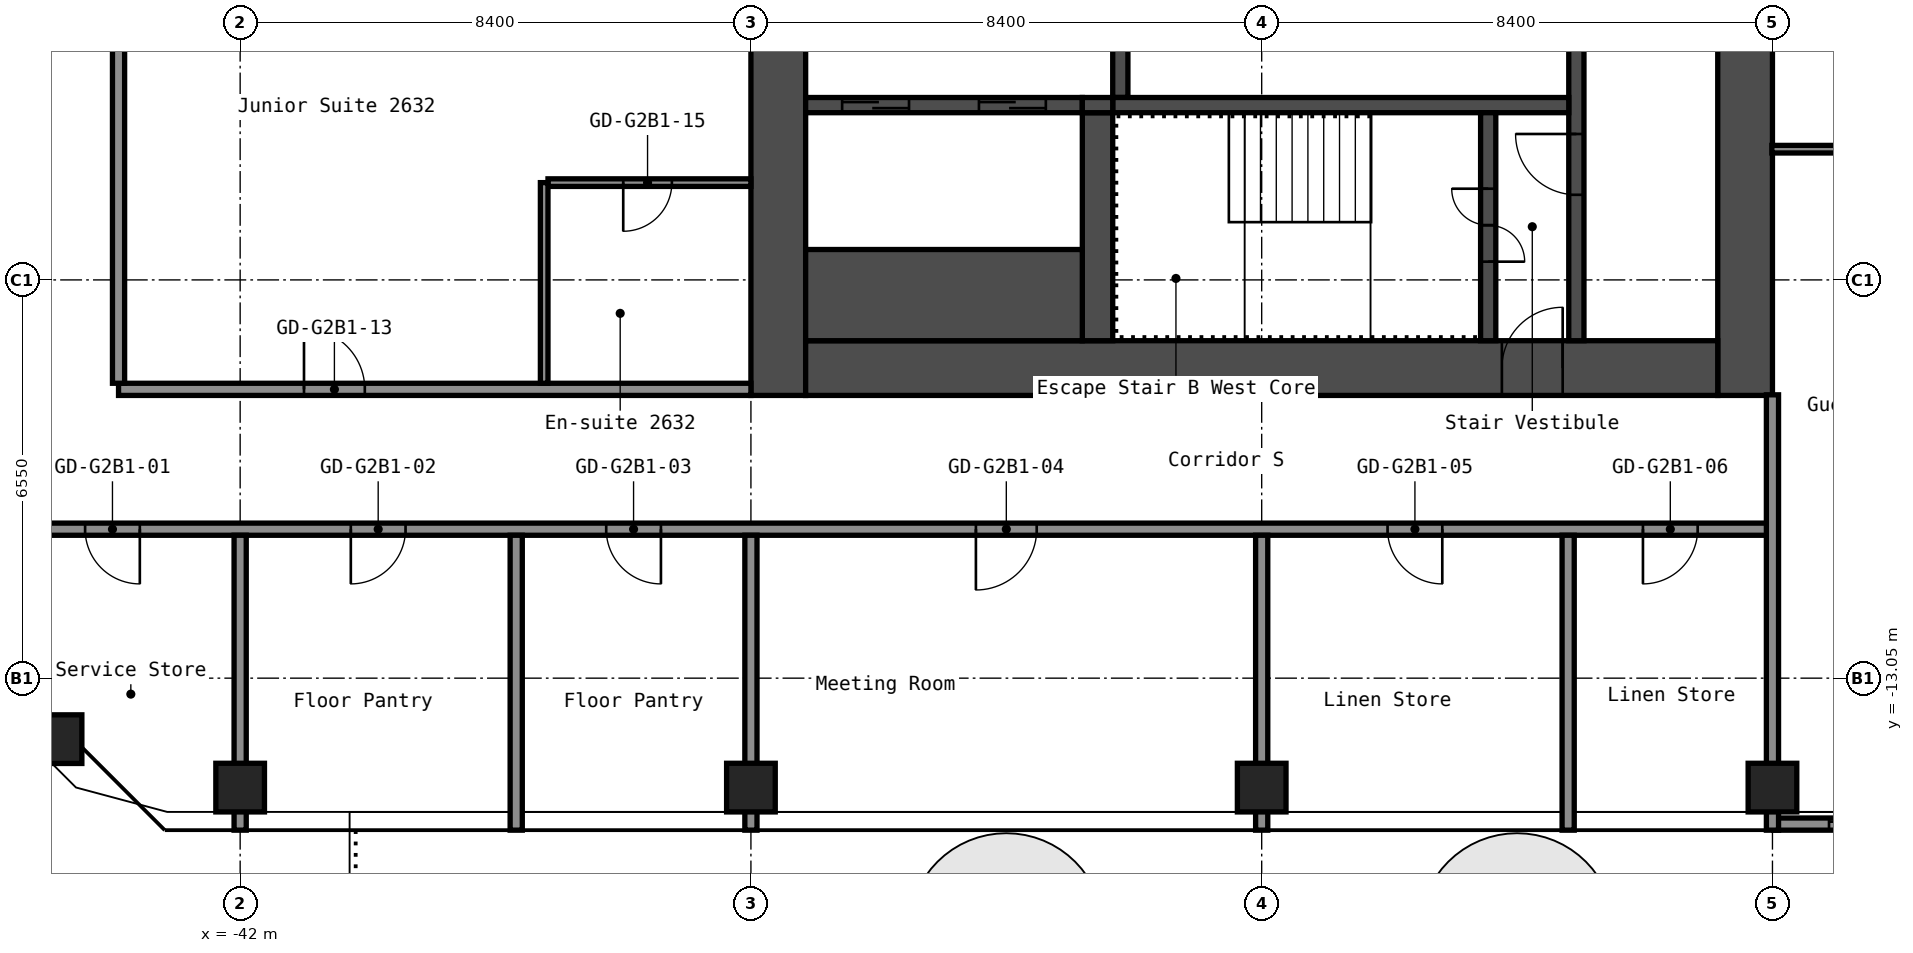
"""IFC4 building model, lengths in metres.
Left out: names, types, materials, properties, quantities, classifications, styles, units other than length and angle.
Written with IfcOpenShell. Run it as: python <this file> out.ifc"""

import sys

from ifc_helpers import new_model, si_unit, direction, frame, frame_2d, origin, origin_2d, place, context, subcontext, project, spatial, rectangle, hollow_rectangle, extrude, element, fill, save


model = new_model("IFC4")
c1 = context("Model", 3, precision=1e-05, world=origin(), true_north=direction((0.0, 1.0)))
c2 = subcontext(c1, "Body", "Model", "MODEL_VIEW")
j1 = project(units=[si_unit("LENGTHUNIT", "METRE"), si_unit("PLANEANGLEUNIT", "RADIAN")], contexts=[c1])
p1 = place(None, origin())
s1 = spatial("IfcSite", under=j1, at=p1, CompositionType="ELEMENT")
p2 = place(p1, origin())
s2 = spatial("IfcBuilding", under=s1, at=p2, CompositionType="ELEMENT")
p3 = place(p2, frame((0.0, 0.0, 94.6)))
s3 = spatial("IfcBuildingStorey", under=s2, at=p3, CompositionType="ELEMENT", Elevation=94.6)
for number, where, z_axis, x_axis in (
    (1, (-45.003, -14.053, 0.0), (0.0, 0.0, 1.0), (1.0, 0.0, 0.0)),
    (2, (-42.0, -14.85, 0.0), (0.0, 0.0, 1.0), (1.0, 0.0, 0.0)),
    (3, (-33.6, -14.85, 0.0), (0.0, 0.0, 1.0), (1.0, 0.0, 0.0)),
    (4, (-25.2, -14.85, 0.0), (0.0, 0.0, 1.0), (1.0, 0.0, 0.0)),
    (5, (-16.8, -14.85, 0.0), (0.0, 0.0, 1.0), (1.0, 0.0, 0.0)),
):
    element("IfcColumn", number, at=place(p3, frame(where, z_axis=z_axis, x_axis=x_axis)), inside=s3, PredefinedType="COLUMN", context=c2, shape_type="SweptSolid", body=[
        extrude(hollow_rectangle(XDim=0.8, YDim=0.8, WallThickness=0.032, at=origin_2d()), origin(), (0.0, 0.0, 1.0), 2.8),
    ])
p4 = place(p3, frame((-17.25, -8.4, 0.0), z_axis=(0.0, 0.0, 1.0), x_axis=(0.0, 1.0, 0.0)))
e6 = element("IfcWall", 6, at=p4, inside=s3, PredefinedType="SHEAR", context=c2, shape_type="SweptSolid", body=[
    extrude(rectangle(XDim=16.8, YDim=0.9, at=frame_2d((8.4, 0.0))), origin(), (0.0, 0.0, 1.0), 2.8),
])
p5 = place(p4, frame((7.6, 0.0, 0.0)))
e7 = element("IfcOpeningElement", 7, at=p5, cuts=e6, PredefinedType="OPENING", context=c2, shape_type="SweptSolid", body=[
    extrude(rectangle(XDim=1.2, YDim=2.1, at=frame_2d((0.6, 1.05))), frame((0.0, 0.46, 0.0), z_axis=(0.0, -1.0, 0.0), x_axis=(1.0, 0.0, 0.0)), (0.0, 0.0, 1.0), 0.92),
])
p6 = place(p3, frame((-33.15, -8.4, 0.0), z_axis=(0.0, 0.0, 1.0), x_axis=(0.0, 1.0, 0.0)))
e8 = element("IfcWall", 8, at=p6, inside=s3, PredefinedType="SHEAR", context=c2, shape_type="SweptSolid", body=[
    extrude(rectangle(XDim=16.8, YDim=0.9, at=frame_2d((8.4, 0.0))), origin(), (0.0, 0.0, 1.0), 2.8),
])
p7 = place(p3, frame((-32.7, -7.95, 0.0), z_axis=(0.0, 0.0, 1.0), x_axis=(1.0, 0.0, 0.0)))
e9 = element("IfcWall", 9, at=p7, inside=s3, PredefinedType="SHEAR", context=c2, shape_type="SweptSolid", body=[
    extrude(rectangle(XDim=15.0, YDim=0.9, at=frame_2d((7.5, 0.0))), origin(), (0.0, 0.0, 1.0), 2.8),
])
p8 = place(p7, frame((11.45, 0.0, 0.0)))
e10 = element("IfcOpeningElement", 10, at=p8, cuts=e9, PredefinedType="OPENING", context=c2, shape_type="SweptSolid", body=[
    extrude(rectangle(XDim=1.0, YDim=2.1, at=frame_2d((0.5, 1.05))), frame((0.0, 0.46, 0.0), z_axis=(0.0, -1.0, 0.0), x_axis=(1.0, 0.0, 0.0)), (0.0, 0.0, 1.0), 0.92),
])
p9 = place(p3, frame((-20.025, -7.5, 0.0), z_axis=(0.0, 0.0, 1.0), x_axis=(0.0, 1.0, 0.0)))
e11 = element("IfcWall", 11, at=p9, inside=s3, PredefinedType="SHEAR", context=c2, shape_type="SweptSolid", body=[
    extrude(rectangle(XDim=6.3, YDim=0.25, at=frame_2d((3.15, 0.0))), origin(), (0.0, 0.0, 1.0), 2.8),
])
p10 = place(p9, frame((2.4, 0.0, 0.0)))
e12 = element("IfcOpeningElement", 12, at=p10, cuts=e11, PredefinedType="OPENING", context=c2, shape_type="SweptSolid", body=[
    extrude(rectangle(XDim=1.0, YDim=2.1, at=frame_2d((0.5, 1.05))), frame((0.0, 0.135, 0.0), z_axis=(0.0, -1.0, 0.0), x_axis=(1.0, 0.0, 0.0)), (0.0, 0.0, 1.0), 0.27),
])
p11 = place(p3, frame((-27.525, -3.5, 0.0), z_axis=(0.0, 0.0, 1.0), x_axis=(0.0, 1.0, 0.0)))
e13 = element("IfcWall", 13, at=p11, inside=s3, PredefinedType="SHEAR", context=c2, shape_type="SweptSolid", body=[
    extrude(rectangle(XDim=2.05, YDim=0.25, at=frame_2d((1.025, 0.0))), origin(), (0.0, 0.0, 1.0), 2.8),
])
p12 = place(p3, frame((-27.65, -3.625, 0.0), z_axis=(0.0, 0.0, 1.0), x_axis=(1.0, 0.0, 0.0)))
e14 = element("IfcWall", 14, at=p12, inside=s3, PredefinedType="SHEAR", context=c2, shape_type="SweptSolid", body=[
    extrude(rectangle(XDim=7.5, YDim=0.25, at=frame_2d((3.75, 0.0))), origin(), (0.0, 0.0, 1.0), 2.8),
])
p13 = place(p3, frame((-21.475, -7.5, 0.0), z_axis=(0.0, 0.0, 1.0), x_axis=(0.0, 1.0, 0.0)))
e15 = element("IfcWall", 15, at=p13, inside=s3, PredefinedType="SHEAR", context=c2, shape_type="SweptSolid", body=[
    extrude(rectangle(XDim=3.75, YDim=0.25, at=frame_2d((1.875, 0.0))), origin(), (0.0, 0.0, 1.0), 2.8),
])
p14 = place(p13, frame((1.3, 0.0, 0.0)))
e16 = element("IfcOpeningElement", 16, at=p14, cuts=e15, PredefinedType="OPENING", context=c2, shape_type="SweptSolid", body=[
    extrude(rectangle(XDim=1.2, YDim=2.1, at=frame_2d((0.6, 1.05))), frame((0.0, 0.135, 0.0), z_axis=(0.0, -1.0, 0.0), x_axis=(1.0, 0.0, 0.0)), (0.0, 0.0, 1.0), 0.27),
])
p15 = place(p3, frame((-27.9, -7.5, 0.0), z_axis=(0.0, 0.0, 1.0), x_axis=(0.0, 1.0, 0.0)))
e17 = element("IfcWall", 17, at=p15, inside=s3, PredefinedType="SHEAR", context=c2, shape_type="SweptSolid", body=[
    extrude(rectangle(XDim=3.75, YDim=0.5, at=frame_2d((1.875, 0.0))), origin(), (0.0, 0.0, 1.0), 2.8),
])
p16 = place(p3, frame((-32.7, -3.625, 0.0), z_axis=(0.0, 0.0, 1.0), x_axis=(1.0, 0.0, 0.0)))
e18 = element("IfcWall", 18, at=p16, inside=s3, PredefinedType="SHEAR", context=c2, shape_type="SweptSolid", body=[
    extrude(rectangle(XDim=4.55, YDim=0.25, at=frame_2d((2.275, 0.0))), origin(), (0.0, 0.0, 1.0), 2.8),
])
p17 = place(p16, frame((2.85, 0.0, 0.0)))
e19 = element("IfcOpeningElement", 19, at=p17, cuts=e18, PredefinedType="OPENING", context=c2, shape_type="SweptSolid", body=[
    extrude(rectangle(XDim=1.1, YDim=2.1, at=frame_2d((0.55, 1.05))), frame((0.0, 0.135, 0.0), z_axis=(0.0, -1.0, 0.0), x_axis=(1.0, 0.0, 0.0)), (0.0, 0.0, 1.0), 0.27),
])
p18 = place(p16, frame((0.6, 0.0, 0.0)))
e20 = element("IfcOpeningElement", 20, at=p18, cuts=e18, PredefinedType="OPENING", context=c2, shape_type="SweptSolid", body=[
    extrude(rectangle(XDim=1.1, YDim=2.1, at=frame_2d((0.55, 1.05))), frame((0.0, 0.135, 0.0), z_axis=(0.0, -1.0, 0.0), x_axis=(1.0, 0.0, 0.0)), (0.0, 0.0, 1.0), 0.27),
])
p19 = place(p3, frame((-32.7, -6.75, 0.0), z_axis=(0.0, 0.0, 1.0), x_axis=(1.0, 0.0, 0.0)))
e21 = element("IfcWall", 21, at=p19, inside=s3, PredefinedType="SHEAR", context=c2, shape_type="SweptSolid", body=[
    extrude(rectangle(XDim=4.55, YDim=1.5, at=frame_2d((2.275, 0.0))), origin(), (0.0, 0.0, 1.0), 2.8),
])
p20 = place(p3, frame((-28.15, -3.625, 0.0), z_axis=(0.0, 0.0, 1.0), x_axis=(1.0, 0.0, 0.0)))
e22 = element("IfcWall", 22, at=p20, inside=s3, PredefinedType="SHEAR", context=c2, shape_type="SweptSolid", body=[
    extrude(rectangle(XDim=0.5, YDim=0.25, at=frame_2d((0.25, 0.0))), origin(), (0.0, 0.0, 1.0), 2.8),
])
p21 = place(p3, frame((-46.5, -10.6, 0.0), z_axis=(0.0, 0.0, 1.0), x_axis=(1.0, 0.0, 0.0)))
e23 = element("IfcWall", 23, at=p21, inside=s3, PredefinedType="PARTITIONING", context=c2, shape_type="SweptSolid", body=[
    extrude(rectangle(XDim=29.7, YDim=0.2, at=frame_2d((14.85, 0.0))), origin(), (0.0, 0.0, 1.0), 2.8),
])
p22 = place(p21, frame((1.95, 0.0, 0.0)))
e24 = element("IfcOpeningElement", 24, at=p22, cuts=e23, PredefinedType="OPENING", context=c2, shape_type="SweptSolid", body=[
    extrude(rectangle(XDim=0.9, YDim=2.1, at=frame_2d((0.45, 1.05))), frame((0.0, 0.11, 0.0), z_axis=(0.0, -1.0, 0.0), x_axis=(1.0, 0.0, 0.0)), (0.0, 0.0, 1.0), 0.22),
])
p23 = place(p21, frame((6.32, 0.0, 0.0)))
e25 = element("IfcOpeningElement", 25, at=p23, cuts=e23, PredefinedType="OPENING", context=c2, shape_type="SweptSolid", body=[
    extrude(rectangle(XDim=0.9, YDim=2.1, at=frame_2d((0.45, 1.05))), frame((0.0, 0.11, 0.0), z_axis=(0.0, -1.0, 0.0), x_axis=(1.0, 0.0, 0.0)), (0.0, 0.0, 1.0), 0.22),
])
p24 = place(p21, frame((10.52, 0.0, 0.0)))
e26 = element("IfcOpeningElement", 26, at=p24, cuts=e23, PredefinedType="OPENING", context=c2, shape_type="SweptSolid", body=[
    extrude(rectangle(XDim=0.9, YDim=2.1, at=frame_2d((0.45, 1.05))), frame((0.0, 0.11, 0.0), z_axis=(0.0, -1.0, 0.0), x_axis=(1.0, 0.0, 0.0)), (0.0, 0.0, 1.0), 0.22),
])
p25 = place(p21, frame((16.6, 0.0, 0.0)))
e27 = element("IfcOpeningElement", 27, at=p25, cuts=e23, PredefinedType="OPENING", context=c2, shape_type="SweptSolid", body=[
    extrude(rectangle(XDim=1.0, YDim=2.1, at=frame_2d((0.5, 1.05))), frame((0.0, 0.11, 0.0), z_axis=(0.0, -1.0, 0.0), x_axis=(1.0, 0.0, 0.0)), (0.0, 0.0, 1.0), 0.22),
])
p26 = place(p21, frame((23.37, 0.0, 0.0)))
e28 = element("IfcOpeningElement", 28, at=p26, cuts=e23, PredefinedType="OPENING", context=c2, shape_type="SweptSolid", body=[
    extrude(rectangle(XDim=0.9, YDim=2.1, at=frame_2d((0.45, 1.05))), frame((0.0, 0.11, 0.0), z_axis=(0.0, -1.0, 0.0), x_axis=(1.0, 0.0, 0.0)), (0.0, 0.0, 1.0), 0.22),
])
p27 = place(p21, frame((27.57, 0.0, 0.0)))
e29 = element("IfcOpeningElement", 29, at=p27, cuts=e23, PredefinedType="OPENING", context=c2, shape_type="SweptSolid", body=[
    extrude(rectangle(XDim=0.9, YDim=2.1, at=frame_2d((0.45, 1.05))), frame((0.0, 0.11, 0.0), z_axis=(0.0, -1.0, 0.0), x_axis=(1.0, 0.0, 0.0)), (0.0, 0.0, 1.0), 0.22),
])
p28 = place(p3, frame((-44.0, -8.3, 0.0), z_axis=(0.0, 0.0, 1.0), x_axis=(1.0, 0.0, 0.0)))
e30 = element("IfcWall", 30, at=p28, inside=s3, PredefinedType="PARTITIONING", context=c2, shape_type="SweptSolid", body=[
    extrude(rectangle(XDim=10.4, YDim=0.2, at=frame_2d((5.2, 0.0))), origin(), (0.0, 0.0, 1.0), 2.8),
])
p29 = place(p28, frame((3.05, 0.0, 0.0)))
e31 = element("IfcOpeningElement", 31, at=p29, cuts=e30, PredefinedType="OPENING", context=c2, shape_type="SweptSolid", body=[
    extrude(rectangle(XDim=1.0, YDim=2.1, at=frame_2d((0.5, 1.05))), frame((0.0, 0.11, 0.0), z_axis=(0.0, -1.0, 0.0), x_axis=(1.0, 0.0, 0.0)), (0.0, 0.0, 1.0), 0.22),
])
p30 = place(p3, frame((-36.938, -4.9, 0.0), z_axis=(0.0, 0.0, 1.0), x_axis=(1.0, 0.0, 0.0)))
e32 = element("IfcWall", 32, at=p30, inside=s3, PredefinedType="PARTITIONING", context=c2, shape_type="SweptSolid", body=[
    extrude(rectangle(XDim=3.337, YDim=0.125, at=frame_2d((1.669, 0.0))), origin(), (0.0, 0.0, 1.0), 2.8),
])
p31 = place(p30, frame((1.238, 0.0, 0.0)))
e33 = element("IfcOpeningElement", 33, at=p31, cuts=e32, PredefinedType="OPENING", context=c2, shape_type="SweptSolid", body=[
    extrude(rectangle(XDim=0.8, YDim=2.1, at=frame_2d((0.4, 1.05))), frame((0.0, 0.073, 0.0), z_axis=(0.0, -1.0, 0.0), x_axis=(1.0, 0.0, 0.0)), (0.0, 0.0, 1.0), 0.145),
])
p32 = place(p3, frame((-16.81, -4.35, 0.0), z_axis=(0.0, 0.0, 1.0), x_axis=(1.0, 0.0, 0.0)))
e34 = element("IfcWall", 34, at=p32, inside=s3, PredefinedType="PARTITIONING", context=c2, shape_type="SweptSolid", body=[
    extrude(rectangle(XDim=2.448, YDim=0.125, at=frame_2d((1.224, 0.0))), origin(), (0.0, 0.0, 1.0), 2.8),
])
p33 = place(p3, frame((-44.0, -8.2, 0.0), z_axis=(0.0, 0.0, 1.0), x_axis=(0.0, 1.0, 0.0)))
e35 = element("IfcWall", 35, at=p33, inside=s3, PredefinedType="PARTITIONING", context=c2, shape_type="SweptSolid", body=[
    extrude(rectangle(XDim=16.4, YDim=0.2, at=frame_2d((8.2, 0.0))), origin(), (0.0, 0.0, 1.0), 2.8),
])
for number, where, z_axis, x_axis in (
    (36, (-42.0, -15.55, 0.0), (0.0, 0.0, 1.0), (0.0, 1.0, 0.0)),
    (37, (-37.46, -15.55, 0.0), (0.0, 0.0, 1.0), (0.0, 1.0, 0.0)),
):
    element("IfcWall", number, at=place(p3, frame(where, z_axis=z_axis, x_axis=x_axis)), inside=s3, PredefinedType="PARTITIONING", context=c2, shape_type="SweptSolid", body=[
        extrude(rectangle(XDim=4.85, YDim=0.2, at=frame_2d((2.425, 0.0))), origin(), (0.0, 0.0, 1.0), 2.8),
    ])
p34 = place(p3, frame((-37.0, -8.2, 0.0), z_axis=(0.0, 0.0, 1.0), x_axis=(0.0, 1.0, 0.0)))
e38 = element("IfcWall", 38, at=p34, inside=s3, PredefinedType="PARTITIONING", context=c2, shape_type="SweptSolid", body=[
    extrude(rectangle(XDim=3.3, YDim=0.125, at=frame_2d((1.65, 0.0))), origin(), (0.0, 0.0, 1.0), 2.8),
])
for number, where, z_axis, x_axis in (
    (39, (-33.6, -15.55, 0.0), (0.0, 0.0, 1.0), (0.0, 1.0, 0.0)),
    (40, (-25.2, -15.55, 0.0), (0.0, 0.0, 1.0), (0.0, 1.0, 0.0)),
    (41, (-20.16, -15.55, 0.0), (0.0, 0.0, 1.0), (0.0, 1.0, 0.0)),
):
    element("IfcWall", number, at=place(p3, frame(where, z_axis=z_axis, x_axis=x_axis)), inside=s3, PredefinedType="PARTITIONING", context=c2, shape_type="SweptSolid", body=[
        extrude(rectangle(XDim=4.85, YDim=0.2, at=frame_2d((2.425, 0.0))), origin(), (0.0, 0.0, 1.0), 2.8),
    ])
p35 = place(p3, frame((-16.8, -15.55, 0.0), z_axis=(0.0, 0.0, 1.0), x_axis=(0.0, 1.0, 0.0)))
e42 = element("IfcWall", 42, at=p35, inside=s3, PredefinedType="PARTITIONING", context=c2, shape_type="SweptSolid", body=[
    extrude(rectangle(XDim=7.16, YDim=0.2, at=frame_2d((3.58, 0.0))), origin(), (0.0, 0.0, 1.0), 2.8),
])
p36 = place(p3, frame((-16.78, -15.45, 0.0), z_axis=(0.0, 0.0, 1.0), x_axis=(1.0, 0.0, 0.0)))
p37 = place(p36, frame((0.91, 0.0, 0.0)))
p38 = place(p37, frame((2.4, 0.0, 0.0), z_axis=(0.0, 0.0, 1.0), x_axis=(-1.0, 0.0, 0.0)))
e43 = element("IfcDoor", 43, at=p38, inside=s3, OperationType="SLIDING_TO_LEFT", PredefinedType="DOOR", context=c2, shape_type="SweptSolid", body=[
    extrude(rectangle(XDim=2.4, YDim=2.2, at=frame_2d((1.2, 1.1))), frame((0.0, 0.025, 0.0), z_axis=(0.0, -1.0, 0.0), x_axis=(1.0, 0.0, 0.0)), (0.0, 0.0, 1.0), 0.05),
])
p39 = place(p8, origin())
e44 = element("IfcDoor", 44, at=p39, inside=s3, OperationType="SINGLE_SWING_LEFT", PredefinedType="DOOR", context=c2, shape_type="SweptSolid", body=[
    extrude(rectangle(XDim=1.0, YDim=2.1, at=frame_2d((0.5, 1.05))), frame((0.0, 0.025, 0.0), z_axis=(0.0, -1.0, 0.0), x_axis=(1.0, 0.0, 0.0)), (0.0, 0.0, 1.0), 0.05),
])
fill(e10, e44)
p40 = place(p14, origin())
e45 = element("IfcDoor", 45, at=p40, inside=s3, OperationType="DOUBLE_DOOR_SINGLE_SWING", PredefinedType="DOOR", context=c2, shape_type="SweptSolid", body=[
    extrude(rectangle(XDim=1.2, YDim=2.1, at=frame_2d((0.6, 1.05))), frame((0.0, 0.025, 0.0), z_axis=(0.0, -1.0, 0.0), x_axis=(1.0, 0.0, 0.0)), (0.0, 0.0, 1.0), 0.05),
])
fill(e16, e45)
p41 = place(p10, origin())
e46 = element("IfcDoor", 46, at=p41, inside=s3, OperationType="SINGLE_SWING_LEFT", PredefinedType="DOOR", context=c2, shape_type="SweptSolid", body=[
    extrude(rectangle(XDim=1.0, YDim=2.1, at=frame_2d((0.5, 1.05))), frame((0.0, 0.025, 0.0), z_axis=(0.0, -1.0, 0.0), x_axis=(1.0, 0.0, 0.0)), (0.0, 0.0, 1.0), 0.05),
])
fill(e12, e46)
p42 = place(p17, origin())
e47 = element("IfcDoor", 47, at=p42, inside=s3, OperationType="DOUBLE_DOOR_SLIDING", PredefinedType="DOOR", context=c2, shape_type="SweptSolid", body=[
    extrude(rectangle(XDim=1.1, YDim=2.1, at=frame_2d((0.55, 1.05))), frame((0.0, 0.025, 0.0), z_axis=(0.0, -1.0, 0.0), x_axis=(1.0, 0.0, 0.0)), (0.0, 0.0, 1.0), 0.05),
])
fill(e19, e47)
p43 = place(p18, origin())
e48 = element("IfcDoor", 48, at=p43, inside=s3, OperationType="DOUBLE_DOOR_SLIDING", PredefinedType="DOOR", context=c2, shape_type="SweptSolid", body=[
    extrude(rectangle(XDim=1.1, YDim=2.1, at=frame_2d((0.55, 1.05))), frame((0.0, 0.025, 0.0), z_axis=(0.0, -1.0, 0.0), x_axis=(1.0, 0.0, 0.0)), (0.0, 0.0, 1.0), 0.05),
])
fill(e20, e48)
p44 = place(p22, origin())
e49 = element("IfcDoor", 49, at=p44, inside=s3, OperationType="SINGLE_SWING_RIGHT", PredefinedType="DOOR", context=c2, shape_type="SweptSolid", body=[
    extrude(rectangle(XDim=0.9, YDim=2.1, at=frame_2d((0.45, 1.05))), frame((0.0, 0.025, 0.0), z_axis=(0.0, -1.0, 0.0), x_axis=(1.0, 0.0, 0.0)), (0.0, 0.0, 1.0), 0.05),
])
fill(e24, e49)
p45 = place(p23, origin())
e50 = element("IfcDoor", 50, at=p45, inside=s3, OperationType="SINGLE_SWING_LEFT", PredefinedType="DOOR", context=c2, shape_type="SweptSolid", body=[
    extrude(rectangle(XDim=0.9, YDim=2.1, at=frame_2d((0.45, 1.05))), frame((0.0, 0.025, 0.0), z_axis=(0.0, -1.0, 0.0), x_axis=(1.0, 0.0, 0.0)), (0.0, 0.0, 1.0), 0.05),
])
fill(e25, e50)
p46 = place(p24, origin())
e51 = element("IfcDoor", 51, at=p46, inside=s3, OperationType="SINGLE_SWING_RIGHT", PredefinedType="DOOR", context=c2, shape_type="SweptSolid", body=[
    extrude(rectangle(XDim=0.9, YDim=2.1, at=frame_2d((0.45, 1.05))), frame((0.0, 0.025, 0.0), z_axis=(0.0, -1.0, 0.0), x_axis=(1.0, 0.0, 0.0)), (0.0, 0.0, 1.0), 0.05),
])
fill(e26, e51)
p47 = place(p25, origin())
e52 = element("IfcDoor", 52, at=p47, inside=s3, OperationType="SINGLE_SWING_LEFT", PredefinedType="DOOR", context=c2, shape_type="SweptSolid", body=[
    extrude(rectangle(XDim=1.0, YDim=2.1, at=frame_2d((0.5, 1.05))), frame((0.0, 0.025, 0.0), z_axis=(0.0, -1.0, 0.0), x_axis=(1.0, 0.0, 0.0)), (0.0, 0.0, 1.0), 0.05),
])
fill(e27, e52)
p48 = place(p26, origin())
e53 = element("IfcDoor", 53, at=p48, inside=s3, OperationType="SINGLE_SWING_RIGHT", PredefinedType="DOOR", context=c2, shape_type="SweptSolid", body=[
    extrude(rectangle(XDim=0.9, YDim=2.1, at=frame_2d((0.45, 1.05))), frame((0.0, 0.025, 0.0), z_axis=(0.0, -1.0, 0.0), x_axis=(1.0, 0.0, 0.0)), (0.0, 0.0, 1.0), 0.05),
])
fill(e28, e53)
p49 = place(p27, origin())
e54 = element("IfcDoor", 54, at=p49, inside=s3, OperationType="SINGLE_SWING_LEFT", PredefinedType="DOOR", context=c2, shape_type="SweptSolid", body=[
    extrude(rectangle(XDim=0.9, YDim=2.1, at=frame_2d((0.45, 1.05))), frame((0.0, 0.025, 0.0), z_axis=(0.0, -1.0, 0.0), x_axis=(1.0, 0.0, 0.0)), (0.0, 0.0, 1.0), 0.05),
])
fill(e29, e54)
p50 = place(p29, origin())
e55 = element("IfcDoor", 55, at=p50, inside=s3, OperationType="SINGLE_SWING_RIGHT", PredefinedType="DOOR", context=c2, shape_type="SweptSolid", body=[
    extrude(rectangle(XDim=1.0, YDim=2.1, at=frame_2d((0.5, 1.05))), frame((0.0, 0.025, 0.0), z_axis=(0.0, -1.0, 0.0), x_axis=(1.0, 0.0, 0.0)), (0.0, 0.0, 1.0), 0.05),
])
fill(e31, e55)
p51 = place(p31, origin())
e56 = element("IfcDoor", 56, at=p51, inside=s3, OperationType="SINGLE_SWING_LEFT", PredefinedType="DOOR", context=c2, shape_type="SweptSolid", body=[
    extrude(rectangle(XDim=0.8, YDim=2.1, at=frame_2d((0.4, 1.05))), frame((0.0, 0.025, 0.0), z_axis=(0.0, -1.0, 0.0), x_axis=(1.0, 0.0, 0.0)), (0.0, 0.0, 1.0), 0.05),
])
fill(e33, e56)
save(model, sys.argv[1])
